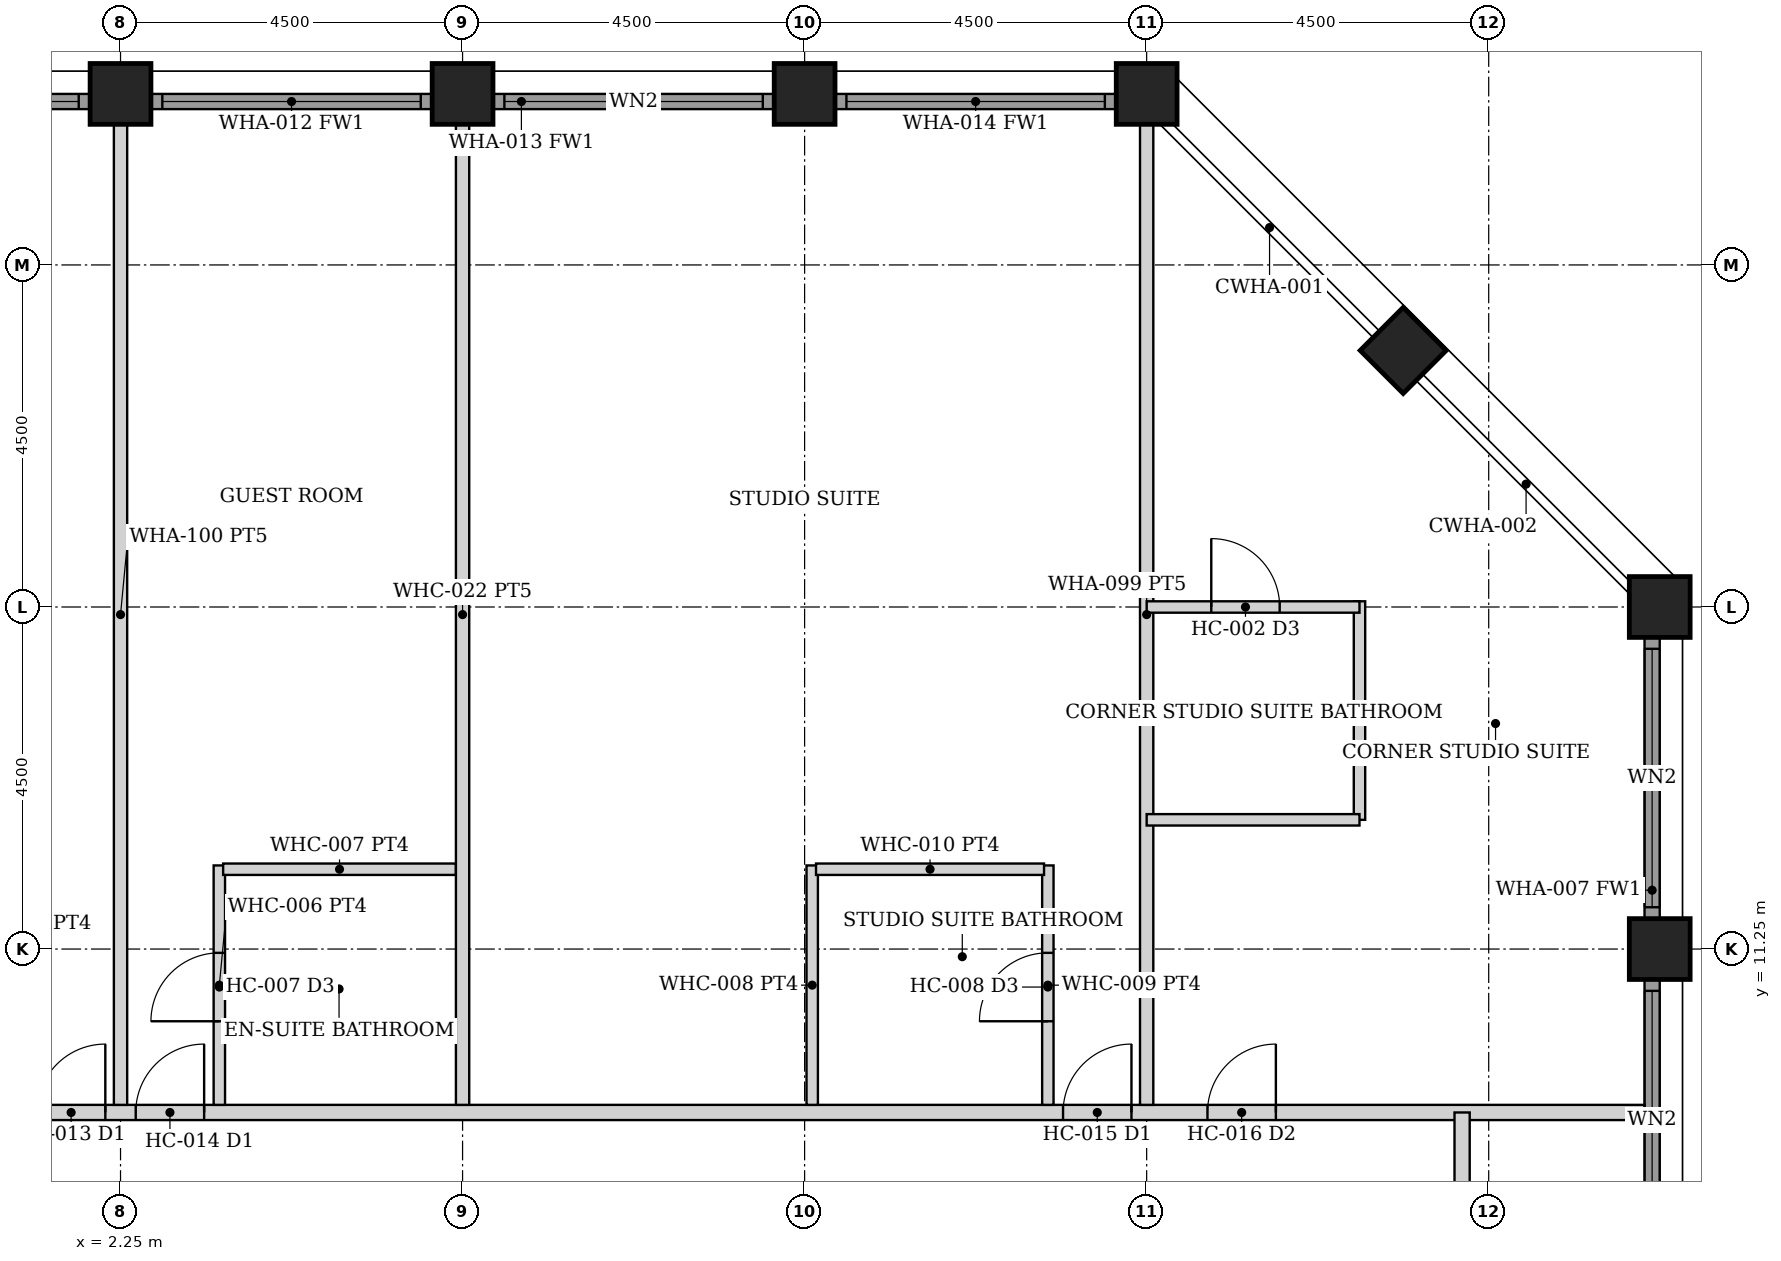
"""IFC4 building model, lengths in metres.
Left out: names, types, materials, properties, quantities, classifications, styles, units other than length and angle.
Written with IfcOpenShell. Run it as: python <this file> out.ifc"""

import sys

from ifc_helpers import new_model, si_unit, direction, frame, frame_2d, origin, origin_2d, place, context, subcontext, project, spatial, rectangle, hollow_rectangle, extrude, element, fill, save


model = new_model("IFC4")
c1 = context("Model", 3, precision=1e-05, world=origin(), true_north=direction((0.0, 1.0)))
c2 = subcontext(c1, "Body", "Model", "MODEL_VIEW")
j1 = project(units=[si_unit("LENGTHUNIT", "METRE"), si_unit("PLANEANGLEUNIT", "RADIAN")], contexts=[c1])
p1 = place(None, origin())
s1 = spatial("IfcSite", under=j1, at=p1, CompositionType="ELEMENT")
p2 = place(p1, origin())
s2 = spatial("IfcBuilding", under=s1, at=p2, CompositionType="ELEMENT")
p3 = place(p2, frame((0.0, 0.0, 140.0)))
s3 = spatial("IfcBuildingStorey", under=s2, at=p3, CompositionType="ELEMENT", Elevation=140.0)
for number, where, z_axis, x_axis in (
    (1, (2.25, 22.5, 0.0), (0.0, 0.0, 1.0), (0.0, 1.0, 0.0)),
    (2, (6.75, 22.5, 0.0), (0.0, 0.0, 1.0), (0.0, 1.0, 0.0)),
    (3, (11.25, 22.5, 0.0), (0.0, 0.0, 1.0), (0.0, 1.0, 0.0)),
    (4, (22.5, 11.25, 0.0), (0.0, 0.0, 1.0), (1.0, 0.0, 0.0)),
    (5, (15.75, 22.5, 0.0), (0.0, 0.0, 1.0), (0.0, 1.0, 0.0)),
    (6, (22.5, 15.75, 0.0), (0.0, 0.0, 1.0), (1.0, 0.0, 0.0)),
    (7, (19.125, 19.125, 0.0), (0.0, 0.0, 1.0), (0.707, 0.707, 0.0)),
):
    element("IfcColumn", number, at=place(p3, frame(where, z_axis=z_axis, x_axis=x_axis)), inside=s3, PredefinedType="COLUMN", context=c2, shape_type="SweptSolid", body=[
        extrude(hollow_rectangle(XDim=0.8, YDim=0.8, WallThickness=0.05, at=origin_2d()), origin(), (0.0, 0.0, 1.0), 3.6),
    ])
p4 = place(p3, frame((22.4, 7.155, 0.0), z_axis=(0.0, 0.0, 1.0), x_axis=(0.0, 1.0, 0.0)))
e8 = element("IfcWall", 8, at=p4, inside=s3, PredefinedType="SOLIDWALL", context=c2, shape_type="SweptSolid", body=[
    extrude(rectangle(XDim=3.69, YDim=0.2, at=frame_2d((1.845, 0.0))), origin(), (0.0, 0.0, 1.0), 2.479),
])
p5 = place(p4, frame((0.145, 0.0, 0.3)))
e9 = element("IfcOpeningElement", 9, at=p5, cuts=e8, PredefinedType="OPENING", context=c2, shape_type="SweptSolid", body=[
    extrude(rectangle(XDim=3.4, YDim=2.029, at=frame_2d((1.7, 1.015))), frame((0.0, 0.11, 0.0), z_axis=(0.0, -1.0, 0.0), x_axis=(1.0, 0.0, 0.0)), (0.0, 0.0, 1.0), 0.22),
])
p6 = place(p3, frame((22.4, 11.655, 0.0), z_axis=(0.0, 0.0, 1.0), x_axis=(0.0, 1.0, 0.0)))
e10 = element("IfcWall", 10, at=p6, inside=s3, PredefinedType="SOLIDWALL", context=c2, shape_type="SweptSolid", body=[
    extrude(rectangle(XDim=3.69, YDim=0.2, at=frame_2d((1.845, 0.0))), origin(), (0.0, 0.0, 1.0), 2.479),
])
p7 = place(p6, frame((0.145, 0.0, 0.3)))
e11 = element("IfcOpeningElement", 11, at=p7, cuts=e10, PredefinedType="OPENING", context=c2, shape_type="SweptSolid", body=[
    extrude(rectangle(XDim=3.4, YDim=2.029, at=frame_2d((1.7, 1.015))), frame((0.0, 0.11, 0.0), z_axis=(0.0, -1.0, 0.0), x_axis=(1.0, 0.0, 0.0)), (0.0, 0.0, 1.0), 0.22),
])
p8 = place(p3, frame((-1.845, 22.4, 0.0), z_axis=(0.0, 0.0, 1.0), x_axis=(1.0, 0.0, 0.0)))
e12 = element("IfcWall", 12, at=p8, inside=s3, PredefinedType="SOLIDWALL", context=c2, shape_type="SweptSolid", body=[
    extrude(rectangle(XDim=3.69, YDim=0.2, at=frame_2d((1.845, 0.0))), origin(), (0.0, 0.0, 1.0), 2.479),
])
p9 = place(p8, frame((0.145, 0.0, 0.3)))
e13 = element("IfcOpeningElement", 13, at=p9, cuts=e12, PredefinedType="OPENING", context=c2, shape_type="SweptSolid", body=[
    extrude(rectangle(XDim=3.4, YDim=2.029, at=frame_2d((1.7, 1.015))), frame((0.0, 0.11, 0.0), z_axis=(0.0, -1.0, 0.0), x_axis=(1.0, 0.0, 0.0)), (0.0, 0.0, 1.0), 0.22),
])
p10 = place(p3, frame((2.655, 22.4, 0.0), z_axis=(0.0, 0.0, 1.0), x_axis=(1.0, 0.0, 0.0)))
e14 = element("IfcWall", 14, at=p10, inside=s3, PredefinedType="SOLIDWALL", context=c2, shape_type="SweptSolid", body=[
    extrude(rectangle(XDim=3.69, YDim=0.2, at=frame_2d((1.845, 0.0))), origin(), (0.0, 0.0, 1.0), 2.479),
])
p11 = place(p10, frame((0.145, 0.0, 0.3)))
e15 = element("IfcOpeningElement", 15, at=p11, cuts=e14, PredefinedType="OPENING", context=c2, shape_type="SweptSolid", body=[
    extrude(rectangle(XDim=3.4, YDim=2.029, at=frame_2d((1.7, 1.015))), frame((0.0, 0.11, 0.0), z_axis=(0.0, -1.0, 0.0), x_axis=(1.0, 0.0, 0.0)), (0.0, 0.0, 1.0), 0.22),
])
p12 = place(p3, frame((7.155, 22.4, 0.0), z_axis=(0.0, 0.0, 1.0), x_axis=(1.0, 0.0, 0.0)))
e16 = element("IfcWall", 16, at=p12, inside=s3, PredefinedType="SOLIDWALL", context=c2, shape_type="SweptSolid", body=[
    extrude(rectangle(XDim=3.69, YDim=0.2, at=frame_2d((1.845, 0.0))), origin(), (0.0, 0.0, 1.0), 2.479),
])
p13 = place(p12, frame((0.145, 0.0, 0.3)))
e17 = element("IfcOpeningElement", 17, at=p13, cuts=e16, PredefinedType="OPENING", context=c2, shape_type="SweptSolid", body=[
    extrude(rectangle(XDim=3.4, YDim=2.029, at=frame_2d((1.7, 1.015))), frame((0.0, 0.11, 0.0), z_axis=(0.0, -1.0, 0.0), x_axis=(1.0, 0.0, 0.0)), (0.0, 0.0, 1.0), 0.22),
])
p14 = place(p3, frame((11.655, 22.4, 0.0), z_axis=(0.0, 0.0, 1.0), x_axis=(1.0, 0.0, 0.0)))
e18 = element("IfcWall", 18, at=p14, inside=s3, PredefinedType="SOLIDWALL", context=c2, shape_type="SweptSolid", body=[
    extrude(rectangle(XDim=3.69, YDim=0.2, at=frame_2d((1.845, 0.0))), origin(), (0.0, 0.0, 1.0), 2.479),
])
p15 = place(p14, frame((0.145, 0.0, 0.3)))
e19 = element("IfcOpeningElement", 19, at=p15, cuts=e18, PredefinedType="OPENING", context=c2, shape_type="SweptSolid", body=[
    extrude(rectangle(XDim=3.4, YDim=2.029, at=frame_2d((1.7, 1.015))), frame((0.0, 0.11, 0.0), z_axis=(0.0, -1.0, 0.0), x_axis=(1.0, 0.0, 0.0)), (0.0, 0.0, 1.0), 0.22),
])
p16 = place(p3, frame((-22.3, 9.1, 0.0), z_axis=(0.0, 0.0, 1.0), x_axis=(1.0, 0.0, 0.0)))
e20 = element("IfcWall", 20, at=p16, inside=s3, PredefinedType="PARTITIONING", context=c2, shape_type="SweptSolid", body=[
    extrude(rectangle(XDim=44.6, YDim=0.2, at=frame_2d((22.3, 0.0))), origin(), (0.0, 0.0, 1.0), 2.473),
])
p17 = place(p16, frame((6.75, 0.0, 0.0)))
e21 = element("IfcOpeningElement", 21, at=p17, cuts=e20, PredefinedType="OPENING", context=c2, shape_type="SweptSolid", body=[
    extrude(rectangle(XDim=0.9, YDim=2.1, at=frame_2d((0.45, 1.05))), frame((0.0, 0.11, 0.0), z_axis=(0.0, -1.0, 0.0), x_axis=(1.0, 0.0, 0.0)), (0.0, 0.0, 1.0), 0.22),
])
p18 = place(p16, frame((14.45, 0.0, 0.0)))
e22 = element("IfcOpeningElement", 22, at=p18, cuts=e20, PredefinedType="OPENING", context=c2, shape_type="SweptSolid", body=[
    extrude(rectangle(XDim=0.9, YDim=2.1, at=frame_2d((0.45, 1.05))), frame((0.0, 0.11, 0.0), z_axis=(0.0, -1.0, 0.0), x_axis=(1.0, 0.0, 0.0)), (0.0, 0.0, 1.0), 0.22),
])
p19 = place(p16, frame((15.75, 0.0, 0.0)))
e23 = element("IfcOpeningElement", 23, at=p19, cuts=e20, PredefinedType="OPENING", context=c2, shape_type="SweptSolid", body=[
    extrude(rectangle(XDim=0.9, YDim=2.1, at=frame_2d((0.45, 1.05))), frame((0.0, 0.11, 0.0), z_axis=(0.0, -1.0, 0.0), x_axis=(1.0, 0.0, 0.0)), (0.0, 0.0, 1.0), 0.22),
])
p20 = place(p16, frame((23.45, 0.0, 0.0)))
e24 = element("IfcOpeningElement", 24, at=p20, cuts=e20, PredefinedType="OPENING", context=c2, shape_type="SweptSolid", body=[
    extrude(rectangle(XDim=0.9, YDim=2.1, at=frame_2d((0.45, 1.05))), frame((0.0, 0.11, 0.0), z_axis=(0.0, -1.0, 0.0), x_axis=(1.0, 0.0, 0.0)), (0.0, 0.0, 1.0), 0.22),
])
p21 = place(p16, frame((24.75, 0.0, 0.0)))
e25 = element("IfcOpeningElement", 25, at=p21, cuts=e20, PredefinedType="OPENING", context=c2, shape_type="SweptSolid", body=[
    extrude(rectangle(XDim=0.9, YDim=2.1, at=frame_2d((0.45, 1.05))), frame((0.0, 0.11, 0.0), z_axis=(0.0, -1.0, 0.0), x_axis=(1.0, 0.0, 0.0)), (0.0, 0.0, 1.0), 0.22),
])
p22 = place(p16, frame((36.95, 0.0, 0.0)))
e26 = element("IfcOpeningElement", 26, at=p22, cuts=e20, PredefinedType="OPENING", context=c2, shape_type="SweptSolid", body=[
    extrude(rectangle(XDim=0.9, YDim=2.1, at=frame_2d((0.45, 1.05))), frame((0.0, 0.11, 0.0), z_axis=(0.0, -1.0, 0.0), x_axis=(1.0, 0.0, 0.0)), (0.0, 0.0, 1.0), 0.22),
])
p23 = place(p16, frame((38.85, 0.0, 0.0)))
e27 = element("IfcOpeningElement", 27, at=p23, cuts=e20, PredefinedType="OPENING", context=c2, shape_type="SweptSolid", body=[
    extrude(rectangle(XDim=0.9, YDim=2.1, at=frame_2d((0.45, 1.05))), frame((0.0, 0.11, 0.0), z_axis=(0.0, -1.0, 0.0), x_axis=(1.0, 0.0, 0.0)), (0.0, 0.0, 1.0), 0.22),
])
p24 = place(p16, frame((4.85, 0.0, 0.0)))
e28 = element("IfcOpeningElement", 28, at=p24, cuts=e20, PredefinedType="OPENING", context=c2, shape_type="SweptSolid", body=[
    extrude(rectangle(XDim=0.9, YDim=2.1, at=frame_2d((0.45, 1.05))), frame((0.0, 0.11, 0.0), z_axis=(0.0, -1.0, 0.0), x_axis=(1.0, 0.0, 0.0)), (0.0, 0.0, 1.0), 0.22),
])
p25 = place(p3, frame((19.9, -9.1, 0.0), z_axis=(0.0, 0.0, 1.0), x_axis=(0.0, 1.0, 0.0)))
e29 = element("IfcWall", 29, at=p25, inside=s3, PredefinedType="PARTITIONING", context=c2, shape_type="SweptSolid", body=[
    extrude(rectangle(XDim=18.2, YDim=0.2, at=frame_2d((9.1, 0.0))), origin(), (0.0, 0.0, 1.0), 2.473),
])
p26 = place(p25, frame((8.6, 0.0, 0.0)))
e30 = element("IfcOpeningElement", 30, at=p26, cuts=e29, PredefinedType="OPENING", context=c2, shape_type="SweptSolid", body=[
    extrude(rectangle(XDim=1.0, YDim=2.1, at=frame_2d((0.5, 1.05))), frame((0.0, 0.11, 0.0), z_axis=(0.0, -1.0, 0.0), x_axis=(1.0, 0.0, 0.0)), (0.0, 0.0, 1.0), 0.22),
])
p27 = place(p3, frame((3.55, 9.2, 0.0), z_axis=(0.0, 0.0, 1.0), x_axis=(0.0, 1.0, 0.0)))
e31 = element("IfcWall", 31, at=p27, inside=s3, PredefinedType="PARTITIONING", context=c2, shape_type="SweptSolid", body=[
    extrude(rectangle(XDim=3.15, YDim=0.15, at=frame_2d((1.575, 0.0))), origin(), (0.0, 0.0, 1.0), 2.473),
])
p28 = place(p27, frame((1.1, 0.0, 0.0)))
e32 = element("IfcOpeningElement", 32, at=p28, cuts=e31, PredefinedType="OPENING", context=c2, shape_type="SweptSolid", body=[
    extrude(rectangle(XDim=0.9, YDim=2.1, at=frame_2d((0.45, 1.05))), frame((0.0, 0.085, 0.0), z_axis=(0.0, -1.0, 0.0), x_axis=(1.0, 0.0, 0.0)), (0.0, 0.0, 1.0), 0.17),
])
p29 = place(p3, frame((3.6, 12.3, 0.0), z_axis=(0.0, 0.0, 1.0), x_axis=(1.0, 0.0, 0.0)))
e33 = element("IfcWall", 33, at=p29, inside=s3, PredefinedType="PARTITIONING", context=c2, shape_type="SweptSolid", body=[
    extrude(rectangle(XDim=3.062, YDim=0.15, at=frame_2d((1.531, 0.0))), origin(), (0.0, 0.0, 1.0), 2.473),
])
p30 = place(p3, frame((14.45, 9.2, 0.0), z_axis=(0.0, 0.0, 1.0), x_axis=(0.0, 1.0, 0.0)))
e34 = element("IfcWall", 34, at=p30, inside=s3, PredefinedType="PARTITIONING", context=c2, shape_type="SweptSolid", body=[
    extrude(rectangle(XDim=3.15, YDim=0.15, at=frame_2d((1.575, 0.0))), origin(), (0.0, 0.0, 1.0), 2.473),
])
p31 = place(p30, frame((1.1, 0.0, 0.0)))
e35 = element("IfcOpeningElement", 35, at=p31, cuts=e34, PredefinedType="OPENING", context=c2, shape_type="SweptSolid", body=[
    extrude(rectangle(XDim=0.9, YDim=2.1, at=frame_2d((0.45, 1.05))), frame((0.0, 0.085, 0.0), z_axis=(0.0, -1.0, 0.0), x_axis=(1.0, 0.0, 0.0)), (0.0, 0.0, 1.0), 0.17),
])
p32 = place(p3, frame((11.35, 9.2, 0.0), z_axis=(0.0, 0.0, 1.0), x_axis=(0.0, 1.0, 0.0)))
e36 = element("IfcWall", 36, at=p32, inside=s3, PredefinedType="PARTITIONING", context=c2, shape_type="SweptSolid", body=[
    extrude(rectangle(XDim=3.15, YDim=0.15, at=frame_2d((1.575, 0.0))), origin(), (0.0, 0.0, 1.0), 2.473),
])
p33 = place(p3, frame((11.4, 12.3, 0.0), z_axis=(0.0, 0.0, 1.0), x_axis=(1.0, 0.0, 0.0)))
e37 = element("IfcWall", 37, at=p33, inside=s3, PredefinedType="PARTITIONING", context=c2, shape_type="SweptSolid", body=[
    extrude(rectangle(XDim=3.0, YDim=0.15, at=frame_2d((1.5, 0.0))), origin(), (0.0, 0.0, 1.0), 2.473),
])
for number, where, z_axis, x_axis in (
    (38, (2.25, 9.2, 0.0), (0.0, 0.0, 1.0), (0.0, 1.0, 0.0)),
    (39, (6.75, 9.2, 0.0), (0.0, 0.0, 1.0), (0.0, 1.0, 0.0)),
    (40, (15.75, 9.2, 0.0), (0.0, 0.0, 1.0), (0.0, 1.0, 0.0)),
):
    element("IfcWall", number, at=place(p3, frame(where, z_axis=z_axis, x_axis=x_axis)), inside=s3, PredefinedType="PARTITIONING", context=c2, shape_type="SweptSolid", body=[
        extrude(rectangle(XDim=12.9, YDim=0.175, at=frame_2d((6.45, 0.0))), origin(), (0.0, 0.0, 1.0), 2.473),
    ])
p34 = place(p3, frame((18.55, 12.95, 0.0), z_axis=(0.0, 0.0, 1.0), x_axis=(0.0, 1.0, 0.0)))
e41 = element("IfcWall", 41, at=p34, inside=s3, PredefinedType="PARTITIONING", context=c2, shape_type="SweptSolid", body=[
    extrude(rectangle(XDim=2.875, YDim=0.15, at=frame_2d((1.438, 0.0))), origin(), (0.0, 0.0, 1.0), 2.473),
])
p35 = place(p3, frame((15.75, 12.95, 0.0), z_axis=(0.0, 0.0, 1.0), x_axis=(1.0, 0.0, 0.0)))
e42 = element("IfcWall", 42, at=p35, inside=s3, PredefinedType="PARTITIONING", context=c2, shape_type="SweptSolid", body=[
    extrude(rectangle(XDim=2.8, YDim=0.15, at=frame_2d((1.4, 0.0))), origin(), (0.0, 0.0, 1.0), 2.473),
])
p36 = place(p3, frame((15.75, 15.75, 0.0), z_axis=(0.0, 0.0, 1.0), x_axis=(1.0, 0.0, 0.0)))
e43 = element("IfcWall", 43, at=p36, inside=s3, PredefinedType="PARTITIONING", context=c2, shape_type="SweptSolid", body=[
    extrude(rectangle(XDim=2.8, YDim=0.15, at=frame_2d((1.4, 0.0))), origin(), (0.0, 0.0, 1.0), 2.473),
])
p37 = place(p36, frame((0.85, 0.0, 0.0)))
e44 = element("IfcOpeningElement", 44, at=p37, cuts=e43, PredefinedType="OPENING", context=c2, shape_type="SweptSolid", body=[
    extrude(rectangle(XDim=0.9, YDim=2.1, at=frame_2d((0.45, 1.05))), frame((0.0, 0.085, 0.0), z_axis=(0.0, -1.0, 0.0), x_axis=(1.0, 0.0, 0.0)), (0.0, 0.0, 1.0), 0.17),
])
p38 = place(p5, origin())
e45 = element("IfcWindow", 45, at=p38, inside=s3, PartitioningType="SINGLE_PANEL", PredefinedType="WINDOW", context=c2, shape_type="SweptSolid", body=[
    extrude(rectangle(XDim=3.4, YDim=2.029, at=frame_2d((1.7, 1.015))), frame((0.0, 0.03, 0.0), z_axis=(0.0, -1.0, 0.0), x_axis=(1.0, 0.0, 0.0)), (0.0, 0.0, 1.0), 0.06),
])
fill(e9, e45)
p39 = place(p7, origin())
e46 = element("IfcWindow", 46, at=p39, inside=s3, PartitioningType="SINGLE_PANEL", PredefinedType="WINDOW", context=c2, shape_type="SweptSolid", body=[
    extrude(rectangle(XDim=3.4, YDim=2.029, at=frame_2d((1.7, 1.015))), frame((0.0, 0.03, 0.0), z_axis=(0.0, -1.0, 0.0), x_axis=(1.0, 0.0, 0.0)), (0.0, 0.0, 1.0), 0.06),
])
fill(e11, e46)
p40 = place(p9, origin())
e47 = element("IfcWindow", 47, at=p40, inside=s3, PartitioningType="SINGLE_PANEL", PredefinedType="WINDOW", context=c2, shape_type="SweptSolid", body=[
    extrude(rectangle(XDim=3.4, YDim=2.029, at=frame_2d((1.7, 1.015))), frame((0.0, 0.03, 0.0), z_axis=(0.0, -1.0, 0.0), x_axis=(1.0, 0.0, 0.0)), (0.0, 0.0, 1.0), 0.06),
])
fill(e13, e47)
p41 = place(p11, origin())
e48 = element("IfcWindow", 48, at=p41, inside=s3, PartitioningType="SINGLE_PANEL", PredefinedType="WINDOW", context=c2, shape_type="SweptSolid", body=[
    extrude(rectangle(XDim=3.4, YDim=2.029, at=frame_2d((1.7, 1.015))), frame((0.0, 0.03, 0.0), z_axis=(0.0, -1.0, 0.0), x_axis=(1.0, 0.0, 0.0)), (0.0, 0.0, 1.0), 0.06),
])
fill(e15, e48)
p42 = place(p13, origin())
e49 = element("IfcWindow", 49, at=p42, inside=s3, PartitioningType="SINGLE_PANEL", PredefinedType="WINDOW", context=c2, shape_type="SweptSolid", body=[
    extrude(rectangle(XDim=3.4, YDim=2.029, at=frame_2d((1.7, 1.015))), frame((0.0, 0.03, 0.0), z_axis=(0.0, -1.0, 0.0), x_axis=(1.0, 0.0, 0.0)), (0.0, 0.0, 1.0), 0.06),
])
fill(e17, e49)
p43 = place(p15, origin())
e50 = element("IfcWindow", 50, at=p43, inside=s3, PartitioningType="SINGLE_PANEL", PredefinedType="WINDOW", context=c2, shape_type="SweptSolid", body=[
    extrude(rectangle(XDim=3.4, YDim=2.029, at=frame_2d((1.7, 1.015))), frame((0.0, 0.03, 0.0), z_axis=(0.0, -1.0, 0.0), x_axis=(1.0, 0.0, 0.0)), (0.0, 0.0, 1.0), 0.06),
])
fill(e19, e50)
p44 = place(p20, origin())
e51 = element("IfcDoor", 51, at=p44, inside=s3, OperationType="SINGLE_SWING_RIGHT", PredefinedType="DOOR", context=c2, shape_type="SweptSolid", body=[
    extrude(rectangle(XDim=0.9, YDim=2.1, at=frame_2d((0.45, 1.05))), frame((0.0, 0.025, 0.0), z_axis=(0.0, -1.0, 0.0), x_axis=(1.0, 0.0, 0.0)), (0.0, 0.0, 1.0), 0.05),
])
fill(e24, e51)
p45 = place(p21, origin())
e52 = element("IfcDoor", 52, at=p45, inside=s3, OperationType="SINGLE_SWING_RIGHT", PredefinedType="DOOR", context=c2, shape_type="SweptSolid", body=[
    extrude(rectangle(XDim=0.9, YDim=2.1, at=frame_2d((0.45, 1.05))), frame((0.0, 0.025, 0.0), z_axis=(0.0, -1.0, 0.0), x_axis=(1.0, 0.0, 0.0)), (0.0, 0.0, 1.0), 0.05),
])
fill(e25, e52)
p46 = place(p28, origin())
e53 = element("IfcDoor", 53, at=p46, inside=s3, OperationType="SINGLE_SWING_LEFT", PredefinedType="DOOR", context=c2, shape_type="SweptSolid", body=[
    extrude(rectangle(XDim=0.9, YDim=2.1, at=frame_2d((0.45, 1.05))), frame((0.0, 0.025, 0.0), z_axis=(0.0, -1.0, 0.0), x_axis=(1.0, 0.0, 0.0)), (0.0, 0.0, 1.0), 0.05),
])
fill(e32, e53)
p47 = place(p22, origin())
e54 = element("IfcDoor", 54, at=p47, inside=s3, OperationType="SINGLE_SWING_RIGHT", PredefinedType="DOOR", context=c2, shape_type="SweptSolid", body=[
    extrude(rectangle(XDim=0.9, YDim=2.1, at=frame_2d((0.45, 1.05))), frame((0.0, 0.025, 0.0), z_axis=(0.0, -1.0, 0.0), x_axis=(1.0, 0.0, 0.0)), (0.0, 0.0, 1.0), 0.05),
])
fill(e26, e54)
p48 = place(p31, origin())
e55 = element("IfcDoor", 55, at=p48, inside=s3, OperationType="SINGLE_SWING_LEFT", PredefinedType="DOOR", context=c2, shape_type="SweptSolid", body=[
    extrude(rectangle(XDim=0.9, YDim=2.1, at=frame_2d((0.45, 1.05))), frame((0.0, 0.025, 0.0), z_axis=(0.0, -1.0, 0.0), x_axis=(1.0, 0.0, 0.0)), (0.0, 0.0, 1.0), 0.05),
])
fill(e35, e55)
p49 = place(p23, origin())
e56 = element("IfcDoor", 56, at=p49, inside=s3, OperationType="SINGLE_SWING_RIGHT", PredefinedType="DOOR", context=c2, shape_type="SweptSolid", body=[
    extrude(rectangle(XDim=0.9, YDim=2.1, at=frame_2d((0.45, 1.05))), frame((0.0, 0.025, 0.0), z_axis=(0.0, -1.0, 0.0), x_axis=(1.0, 0.0, 0.0)), (0.0, 0.0, 1.0), 0.05),
])
fill(e27, e56)
p50 = place(p37, origin())
e57 = element("IfcDoor", 57, at=p50, inside=s3, OperationType="SINGLE_SWING_LEFT", PredefinedType="DOOR", context=c2, shape_type="SweptSolid", body=[
    extrude(rectangle(XDim=0.9, YDim=2.1, at=frame_2d((0.45, 1.05))), frame((0.0, 0.025, 0.0), z_axis=(0.0, -1.0, 0.0), x_axis=(1.0, 0.0, 0.0)), (0.0, 0.0, 1.0), 0.05),
])
fill(e44, e57)
save(model, sys.argv[1])
